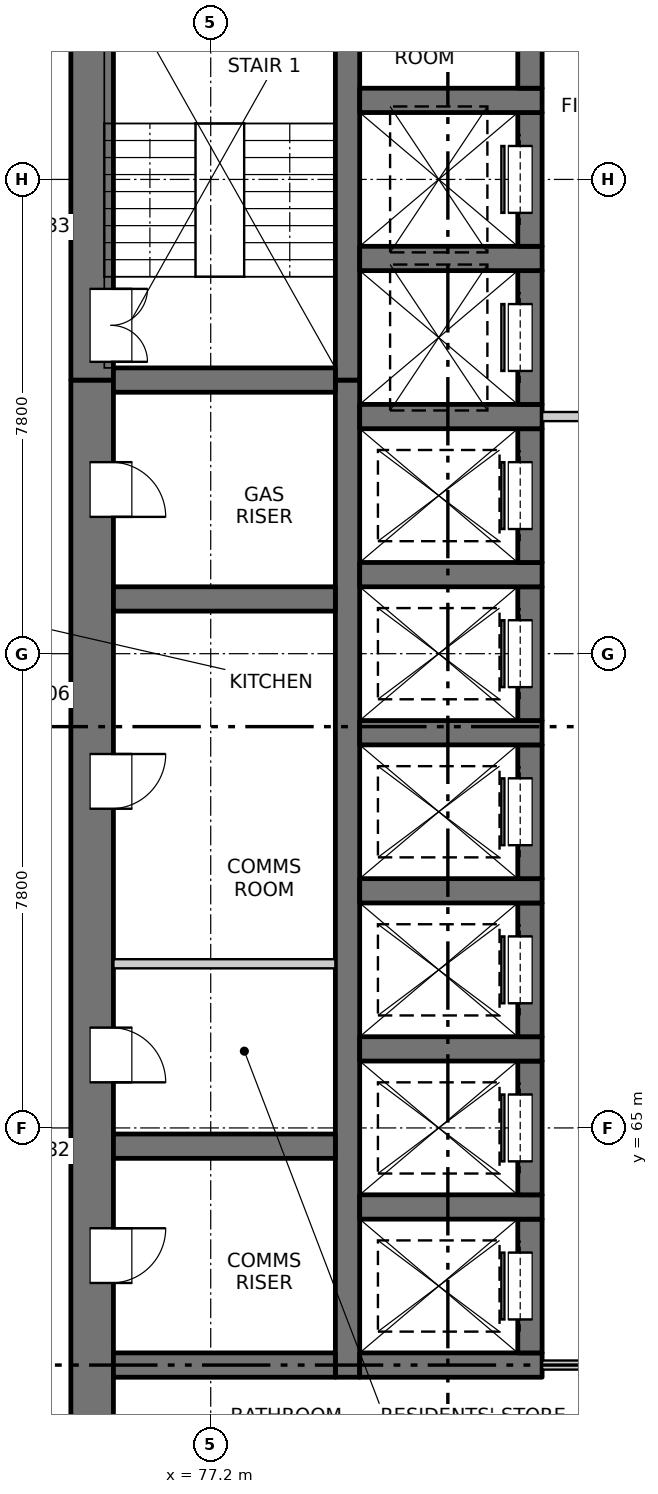
"""IFC4 building model, lengths in metres.
Left out: names, types, materials, properties, quantities, classifications, styles, units other than length and angle.
Written with IfcOpenShell. Run it as: python <this file> out.ifc"""

import sys

from ifc_helpers import new_model, si_unit, direction, frame, frame_2d, origin, place, context, subcontext, project, spatial, rectangle, extrude, element, fill, save


model = new_model("IFC4")
c1 = context("Model", 3, precision=1e-05, world=origin(), true_north=direction((0.0, 1.0)))
c2 = subcontext(c1, "Body", "Model", "MODEL_VIEW")
j1 = project(units=[si_unit("LENGTHUNIT", "METRE"), si_unit("PLANEANGLEUNIT", "RADIAN")], contexts=[c1])
p1 = place(None, origin())
s1 = spatial("IfcSite", under=j1, at=p1, CompositionType="ELEMENT")
p2 = place(p1, origin())
s2 = spatial("IfcBuilding", under=s1, at=p2, CompositionType="ELEMENT")
p3 = place(p2, frame((0.0, 0.0, 19.5)))
s3 = spatial("IfcBuildingStorey", under=s2, at=p3, CompositionType="ELEMENT", Elevation=19.5)
p4 = place(p3, frame((75.25, 54.9, -0.25), z_axis=(0.0, 0.0, 1.0), x_axis=(0.0, 1.0, 0.0)))
e1 = element("IfcWall", 1, at=p4, inside=s3, PredefinedType="SOLIDWALL", context=c2, shape_type="SweptSolid", body=[
    extrude(rectangle(XDim=22.4, YDim=0.7, at=frame_2d((11.2, 0.0))), origin(), (0.0, 0.0, 1.0), 3.4),
])
p5 = place(p4, frame((7.55, 0.0, 0.25)))
e2 = element("IfcOpeningElement", 2, at=p5, cuts=e1, PredefinedType="OPENING", context=c2, shape_type="SweptSolid", body=[
    extrude(rectangle(XDim=0.9, YDim=2.1, at=frame_2d((0.45, 1.05))), frame((0.0, 0.36, 0.0), z_axis=(0.0, -1.0, 0.0), x_axis=(1.0, 0.0, 0.0)), (0.0, 0.0, 1.0), 0.72),
])
p6 = place(p4, frame((10.85, 0.0, 0.25)))
e3 = element("IfcOpeningElement", 3, at=p6, cuts=e1, PredefinedType="OPENING", context=c2, shape_type="SweptSolid", body=[
    extrude(rectangle(XDim=0.9, YDim=2.1, at=frame_2d((0.45, 1.05))), frame((0.0, 0.36, 0.0), z_axis=(0.0, -1.0, 0.0), x_axis=(1.0, 0.0, 0.0)), (0.0, 0.0, 1.0), 0.72),
])
p7 = place(p4, frame((15.35, 0.0, 0.25)))
e4 = element("IfcOpeningElement", 4, at=p7, cuts=e1, PredefinedType="OPENING", context=c2, shape_type="SweptSolid", body=[
    extrude(rectangle(XDim=0.9, YDim=2.1, at=frame_2d((0.45, 1.05))), frame((0.0, 0.36, 0.0), z_axis=(0.0, -1.0, 0.0), x_axis=(1.0, 0.0, 0.0)), (0.0, 0.0, 1.0), 0.72),
])
p8 = place(p4, frame((20.15, 0.0, 0.25)))
e5 = element("IfcOpeningElement", 5, at=p8, cuts=e1, PredefinedType="OPENING", context=c2, shape_type="SweptSolid", body=[
    extrude(rectangle(XDim=0.9, YDim=2.1, at=frame_2d((0.45, 1.05))), frame((0.0, 0.36, 0.0), z_axis=(0.0, -1.0, 0.0), x_axis=(1.0, 0.0, 0.0)), (0.0, 0.0, 1.0), 0.72),
])
p9 = place(p3, frame((75.25, 77.3, -0.25), z_axis=(0.0, 0.0, 1.0), x_axis=(0.0, 1.0, 0.0)))
e6 = element("IfcWall", 6, at=p9, inside=s3, PredefinedType="SOLIDWALL", context=c2, shape_type="SweptSolid", body=[
    extrude(rectangle(XDim=7.55, YDim=0.7, at=frame_2d((3.775, 0.0))), origin(), (0.0, 0.0, 1.0), 3.4),
])
p10 = place(p9, frame((0.3, 0.0, 0.25)))
e7 = element("IfcOpeningElement", 7, at=p10, cuts=e6, PredefinedType="OPENING", context=c2, shape_type="SweptSolid", body=[
    extrude(rectangle(XDim=1.2, YDim=2.1, at=frame_2d((0.6, 1.05))), frame((0.0, 0.36, 0.0), z_axis=(0.0, -1.0, 0.0), x_axis=(1.0, 0.0, 0.0)), (0.0, 0.0, 1.0), 0.72),
])
p11 = place(p3, frame((79.45, 60.9, -0.25), z_axis=(0.0, 0.0, 1.0), x_axis=(0.0, 1.0, 0.0)))
e8 = element("IfcWall", 8, at=p11, inside=s3, PredefinedType="SOLIDWALL", context=c2, shape_type="SweptSolid", body=[
    extrude(rectangle(XDim=16.4, YDim=0.4, at=frame_2d((8.2, 0.0))), origin(), (0.0, 0.0, 1.0), 3.4),
])
p12 = place(p3, frame((79.45, 77.3, -0.25), z_axis=(0.0, 0.0, 1.0), x_axis=(0.0, 1.0, 0.0)))
e9 = element("IfcWall", 9, at=p12, inside=s3, PredefinedType="SOLIDWALL", context=c2, shape_type="SweptSolid", body=[
    extrude(rectangle(XDim=6.85, YDim=0.4, at=frame_2d((3.425, 0.0))), origin(), (0.0, 0.0, 1.0), 3.4),
])
p13 = place(p3, frame((79.65, 61.1, -0.25), z_axis=(0.0, 0.0, 1.0), x_axis=(1.0, 0.0, 0.0)))
e10 = element("IfcWall", 10, at=p13, inside=s3, PredefinedType="SOLIDWALL", context=c2, shape_type="SweptSolid", body=[
    extrude(rectangle(XDim=3.0, YDim=0.4, at=frame_2d((1.5, 0.0))), origin(), (0.0, 0.0, 1.0), 3.4),
])
p14 = place(p3, frame((82.45, 61.3, -0.25), z_axis=(0.0, 0.0, 1.0), x_axis=(0.0, 1.0, 0.0)))
e11 = element("IfcWall", 11, at=p14, inside=s3, PredefinedType="SOLIDWALL", context=c2, shape_type="SweptSolid", body=[
    extrude(rectangle(XDim=2.2, YDim=0.4, at=frame_2d((1.1, 0.0))), origin(), (0.0, 0.0, 1.0), 3.4),
])
p15 = place(p14, frame((0.55, 0.0, 0.25)))
e12 = element("IfcOpeningElement", 12, at=p15, cuts=e11, PredefinedType="OPENING", context=c2, shape_type="SweptSolid", body=[
    extrude(rectangle(XDim=1.1, YDim=2.1, at=frame_2d((0.55, 1.05))), frame((0.0, 0.21, 0.0), z_axis=(0.0, -1.0, 0.0), x_axis=(1.0, 0.0, 0.0)), (0.0, 0.0, 1.0), 0.42),
])
p16 = place(p3, frame((79.65, 63.7, -0.25), z_axis=(0.0, 0.0, 1.0), x_axis=(1.0, 0.0, 0.0)))
e13 = element("IfcWall", 13, at=p16, inside=s3, PredefinedType="SOLIDWALL", context=c2, shape_type="SweptSolid", body=[
    extrude(rectangle(XDim=3.0, YDim=0.4, at=frame_2d((1.5, 0.0))), origin(), (0.0, 0.0, 1.0), 3.4),
])
p17 = place(p3, frame((82.45, 63.9, -0.25), z_axis=(0.0, 0.0, 1.0), x_axis=(0.0, 1.0, 0.0)))
e14 = element("IfcWall", 14, at=p17, inside=s3, PredefinedType="SOLIDWALL", context=c2, shape_type="SweptSolid", body=[
    extrude(rectangle(XDim=2.2, YDim=0.4, at=frame_2d((1.1, 0.0))), origin(), (0.0, 0.0, 1.0), 3.4),
])
p18 = place(p17, frame((0.55, 0.0, 0.25)))
e15 = element("IfcOpeningElement", 15, at=p18, cuts=e14, PredefinedType="OPENING", context=c2, shape_type="SweptSolid", body=[
    extrude(rectangle(XDim=1.1, YDim=2.1, at=frame_2d((0.55, 1.05))), frame((0.0, 0.21, 0.0), z_axis=(0.0, -1.0, 0.0), x_axis=(1.0, 0.0, 0.0)), (0.0, 0.0, 1.0), 0.42),
])
p19 = place(p3, frame((79.65, 66.3, -0.25), z_axis=(0.0, 0.0, 1.0), x_axis=(1.0, 0.0, 0.0)))
e16 = element("IfcWall", 16, at=p19, inside=s3, PredefinedType="SOLIDWALL", context=c2, shape_type="SweptSolid", body=[
    extrude(rectangle(XDim=3.0, YDim=0.4, at=frame_2d((1.5, 0.0))), origin(), (0.0, 0.0, 1.0), 3.4),
])
p20 = place(p3, frame((82.45, 66.5, -0.25), z_axis=(0.0, 0.0, 1.0), x_axis=(0.0, 1.0, 0.0)))
e17 = element("IfcWall", 17, at=p20, inside=s3, PredefinedType="SOLIDWALL", context=c2, shape_type="SweptSolid", body=[
    extrude(rectangle(XDim=2.2, YDim=0.4, at=frame_2d((1.1, 0.0))), origin(), (0.0, 0.0, 1.0), 3.4),
])
p21 = place(p20, frame((0.55, 0.0, 0.25)))
e18 = element("IfcOpeningElement", 18, at=p21, cuts=e17, PredefinedType="OPENING", context=c2, shape_type="SweptSolid", body=[
    extrude(rectangle(XDim=1.1, YDim=2.1, at=frame_2d((0.55, 1.05))), frame((0.0, 0.21, 0.0), z_axis=(0.0, -1.0, 0.0), x_axis=(1.0, 0.0, 0.0)), (0.0, 0.0, 1.0), 0.42),
])
p22 = place(p3, frame((79.65, 68.9, -0.25), z_axis=(0.0, 0.0, 1.0), x_axis=(1.0, 0.0, 0.0)))
e19 = element("IfcWall", 19, at=p22, inside=s3, PredefinedType="SOLIDWALL", context=c2, shape_type="SweptSolid", body=[
    extrude(rectangle(XDim=3.0, YDim=0.4, at=frame_2d((1.5, 0.0))), origin(), (0.0, 0.0, 1.0), 3.4),
])
p23 = place(p3, frame((82.45, 69.1, -0.25), z_axis=(0.0, 0.0, 1.0), x_axis=(0.0, 1.0, 0.0)))
e20 = element("IfcWall", 20, at=p23, inside=s3, PredefinedType="SOLIDWALL", context=c2, shape_type="SweptSolid", body=[
    extrude(rectangle(XDim=2.2, YDim=0.4, at=frame_2d((1.1, 0.0))), origin(), (0.0, 0.0, 1.0), 3.4),
])
p24 = place(p23, frame((0.55, 0.0, 0.25)))
e21 = element("IfcOpeningElement", 21, at=p24, cuts=e20, PredefinedType="OPENING", context=c2, shape_type="SweptSolid", body=[
    extrude(rectangle(XDim=1.1, YDim=2.1, at=frame_2d((0.55, 1.05))), frame((0.0, 0.21, 0.0), z_axis=(0.0, -1.0, 0.0), x_axis=(1.0, 0.0, 0.0)), (0.0, 0.0, 1.0), 0.42),
])
p25 = place(p3, frame((79.65, 71.5, -0.25), z_axis=(0.0, 0.0, 1.0), x_axis=(1.0, 0.0, 0.0)))
e22 = element("IfcWall", 22, at=p25, inside=s3, PredefinedType="SOLIDWALL", context=c2, shape_type="SweptSolid", body=[
    extrude(rectangle(XDim=3.0, YDim=0.4, at=frame_2d((1.5, 0.0))), origin(), (0.0, 0.0, 1.0), 3.4),
])
p26 = place(p3, frame((82.45, 71.7, -0.25), z_axis=(0.0, 0.0, 1.0), x_axis=(0.0, 1.0, 0.0)))
e23 = element("IfcWall", 23, at=p26, inside=s3, PredefinedType="SOLIDWALL", context=c2, shape_type="SweptSolid", body=[
    extrude(rectangle(XDim=2.2, YDim=0.4, at=frame_2d((1.1, 0.0))), origin(), (0.0, 0.0, 1.0), 3.4),
])
p27 = place(p26, frame((0.55, 0.0, 0.25)))
e24 = element("IfcOpeningElement", 24, at=p27, cuts=e23, PredefinedType="OPENING", context=c2, shape_type="SweptSolid", body=[
    extrude(rectangle(XDim=1.1, YDim=2.1, at=frame_2d((0.55, 1.05))), frame((0.0, 0.21, 0.0), z_axis=(0.0, -1.0, 0.0), x_axis=(1.0, 0.0, 0.0)), (0.0, 0.0, 1.0), 0.42),
])
p28 = place(p3, frame((79.65, 74.1, -0.25), z_axis=(0.0, 0.0, 1.0), x_axis=(1.0, 0.0, 0.0)))
e25 = element("IfcWall", 25, at=p28, inside=s3, PredefinedType="SOLIDWALL", context=c2, shape_type="SweptSolid", body=[
    extrude(rectangle(XDim=3.0, YDim=0.4, at=frame_2d((1.5, 0.0))), origin(), (0.0, 0.0, 1.0), 3.4),
])
p29 = place(p3, frame((82.45, 74.3, -0.25), z_axis=(0.0, 0.0, 1.0), x_axis=(0.0, 1.0, 0.0)))
e26 = element("IfcWall", 26, at=p29, inside=s3, PredefinedType="SOLIDWALL", context=c2, shape_type="SweptSolid", body=[
    extrude(rectangle(XDim=2.2, YDim=0.4, at=frame_2d((1.1, 0.0))), origin(), (0.0, 0.0, 1.0), 3.4),
])
p30 = place(p29, frame((0.55, 0.0, 0.25)))
e27 = element("IfcOpeningElement", 27, at=p30, cuts=e26, PredefinedType="OPENING", context=c2, shape_type="SweptSolid", body=[
    extrude(rectangle(XDim=1.1, YDim=2.1, at=frame_2d((0.55, 1.05))), frame((0.0, 0.21, 0.0), z_axis=(0.0, -1.0, 0.0), x_axis=(1.0, 0.0, 0.0)), (0.0, 0.0, 1.0), 0.42),
])
p31 = place(p3, frame((79.65, 76.7, -0.25), z_axis=(0.0, 0.0, 1.0), x_axis=(1.0, 0.0, 0.0)))
e28 = element("IfcWall", 28, at=p31, inside=s3, PredefinedType="SOLIDWALL", context=c2, shape_type="SweptSolid", body=[
    extrude(rectangle(XDim=3.0, YDim=0.4, at=frame_2d((1.5, 0.0))), origin(), (0.0, 0.0, 1.0), 3.4),
])
p32 = place(p3, frame((82.45, 76.9, -0.25), z_axis=(0.0, 0.0, 1.0), x_axis=(0.0, 1.0, 0.0)))
e29 = element("IfcWall", 29, at=p32, inside=s3, PredefinedType="SOLIDWALL", context=c2, shape_type="SweptSolid", body=[
    extrude(rectangle(XDim=2.2, YDim=0.4, at=frame_2d((1.1, 0.0))), origin(), (0.0, 0.0, 1.0), 3.4),
])
p33 = place(p32, frame((0.55, 0.0, 0.25)))
e30 = element("IfcOpeningElement", 30, at=p33, cuts=e29, PredefinedType="OPENING", context=c2, shape_type="SweptSolid", body=[
    extrude(rectangle(XDim=1.1, YDim=2.1, at=frame_2d((0.55, 1.05))), frame((0.0, 0.21, 0.0), z_axis=(0.0, -1.0, 0.0), x_axis=(1.0, 0.0, 0.0)), (0.0, 0.0, 1.0), 0.42),
])
p34 = place(p3, frame((79.65, 79.3, -0.25), z_axis=(0.0, 0.0, 1.0), x_axis=(1.0, 0.0, 0.0)))
e31 = element("IfcWall", 31, at=p34, inside=s3, PredefinedType="SOLIDWALL", context=c2, shape_type="SweptSolid", body=[
    extrude(rectangle(XDim=3.0, YDim=0.4, at=frame_2d((1.5, 0.0))), origin(), (0.0, 0.0, 1.0), 3.4),
])
p35 = place(p3, frame((82.45, 79.5, -0.25), z_axis=(0.0, 0.0, 1.0), x_axis=(0.0, 1.0, 0.0)))
e32 = element("IfcWall", 32, at=p35, inside=s3, PredefinedType="SOLIDWALL", context=c2, shape_type="SweptSolid", body=[
    extrude(rectangle(XDim=2.2, YDim=0.4, at=frame_2d((1.1, 0.0))), origin(), (0.0, 0.0, 1.0), 3.4),
])
p36 = place(p35, frame((0.55, 0.0, 0.25)))
e33 = element("IfcOpeningElement", 33, at=p36, cuts=e32, PredefinedType="OPENING", context=c2, shape_type="SweptSolid", body=[
    extrude(rectangle(XDim=1.1, YDim=2.1, at=frame_2d((0.55, 1.05))), frame((0.0, 0.21, 0.0), z_axis=(0.0, -1.0, 0.0), x_axis=(1.0, 0.0, 0.0)), (0.0, 0.0, 1.0), 0.42),
])
p37 = place(p3, frame((79.65, 81.9, -0.25), z_axis=(0.0, 0.0, 1.0), x_axis=(1.0, 0.0, 0.0)))
e34 = element("IfcWall", 34, at=p37, inside=s3, PredefinedType="SOLIDWALL", context=c2, shape_type="SweptSolid", body=[
    extrude(rectangle(XDim=3.0, YDim=0.4, at=frame_2d((1.5, 0.0))), origin(), (0.0, 0.0, 1.0), 3.4),
])
p38 = place(p3, frame((82.45, 82.1, -0.25), z_axis=(0.0, 0.0, 1.0), x_axis=(0.0, 1.0, 0.0)))
e35 = element("IfcWall", 35, at=p38, inside=s3, PredefinedType="SOLIDWALL", context=c2, shape_type="SweptSolid", body=[
    extrude(rectangle(XDim=2.05, YDim=0.4, at=frame_2d((1.025, 0.0))), origin(), (0.0, 0.0, 1.0), 3.4),
])
p39 = place(p38, frame((0.65, 0.0, 0.25)))
e36 = element("IfcOpeningElement", 36, at=p39, cuts=e35, PredefinedType="OPENING", context=c2, shape_type="SweptSolid", body=[
    extrude(rectangle(XDim=0.9, YDim=2.1, at=frame_2d((0.45, 1.05))), frame((0.0, 0.21, 0.0), z_axis=(0.0, -1.0, 0.0), x_axis=(1.0, 0.0, 0.0)), (0.0, 0.0, 1.0), 0.42),
])
for number, where, z_axis, x_axis in (
    (37, (75.6, 61.1, -0.25), (0.0, 0.0, 1.0), (1.0, 0.0, 0.0)),
    (38, (75.6, 64.7, -0.25), (0.0, 0.0, 1.0), (1.0, 0.0, 0.0)),
    (39, (75.6, 73.7, -0.25), (0.0, 0.0, 1.0), (1.0, 0.0, 0.0)),
    (40, (75.6, 77.3, -0.25), (0.0, 0.0, 1.0), (1.0, 0.0, 0.0)),
):
    element("IfcWall", number, at=place(p3, frame(where, z_axis=z_axis, x_axis=x_axis)), inside=s3, PredefinedType="SOLIDWALL", context=c2, shape_type="SweptSolid", body=[
        extrude(rectangle(XDim=3.65, YDim=0.4, at=frame_2d((1.825, 0.0))), origin(), (0.0, 0.0, 1.0), 3.4),
    ])
p40 = place(p3, frame((82.65, 61.1, 0.0), z_axis=(0.0, 0.0, 1.0), x_axis=(1.0, 0.0, 0.0)))
e41 = element("IfcWall", 41, at=p40, inside=s3, PredefinedType="PARTITIONING", context=c2, shape_type="SweptSolid", body=[
    extrude(rectangle(XDim=4.7, YDim=0.15, at=frame_2d((2.35, 0.0))), origin(), (0.0, 0.0, 1.0), 3.15),
])
p41 = place(p40, frame((1.45, 0.0, 0.0)))
e42 = element("IfcOpeningElement", 42, at=p41, cuts=e41, PredefinedType="OPENING", context=c2, shape_type="SweptSolid", body=[
    extrude(rectangle(XDim=1.8, YDim=2.1, at=frame_2d((0.9, 1.05))), frame((0.0, 0.085, 0.0), z_axis=(0.0, -1.0, 0.0), x_axis=(1.0, 0.0, 0.0)), (0.0, 0.0, 1.0), 0.17),
])
p42 = place(p3, frame((75.6, 67.7, 0.0), z_axis=(0.0, 0.0, 1.0), x_axis=(1.0, 0.0, 0.0)))
e43 = element("IfcWall", 43, at=p42, inside=s3, PredefinedType="PARTITIONING", context=c2, shape_type="SweptSolid", body=[
    extrude(rectangle(XDim=3.65, YDim=0.15, at=frame_2d((1.825, 0.0))), origin(), (0.0, 0.0, 1.0), 3.15),
])
p43 = place(p3, frame((82.65, 76.7, 0.0), z_axis=(0.0, 0.0, 1.0), x_axis=(1.0, 0.0, 0.0)))
e44 = element("IfcWall", 44, at=p43, inside=s3, PredefinedType="PARTITIONING", context=c2, shape_type="SweptSolid", body=[
    extrude(rectangle(XDim=4.7, YDim=0.15, at=frame_2d((2.35, 0.0))), origin(), (0.0, 0.0, 1.0), 3.15),
])
p44 = place(p43, frame((1.45, 0.0, 0.0)))
e45 = element("IfcOpeningElement", 45, at=p44, cuts=e44, PredefinedType="OPENING", context=c2, shape_type="SweptSolid", body=[
    extrude(rectangle(XDim=1.8, YDim=2.1, at=frame_2d((0.9, 1.05))), frame((0.0, 0.085, 0.0), z_axis=(0.0, -1.0, 0.0), x_axis=(1.0, 0.0, 0.0)), (0.0, 0.0, 1.0), 0.17),
])
p45 = place(p15, origin())
e46 = element("IfcDoor", 46, at=p45, inside=s3, OperationType="SLIDING_TO_RIGHT", PredefinedType="DOOR", context=c2, shape_type="SweptSolid", body=[
    extrude(rectangle(XDim=1.1, YDim=2.1, at=frame_2d((0.55, 1.05))), frame((0.0, 0.185, 0.0), z_axis=(0.0, -1.0, 0.0), x_axis=(1.0, 0.0, 0.0)), (0.0, 0.0, 1.0), 0.05),
])
fill(e12, e46)
p46 = place(p5, origin())
e47 = element("IfcDoor", 47, at=p46, inside=s3, OperationType="SINGLE_SWING_LEFT", PredefinedType="DOOR", context=c2, shape_type="SweptSolid", body=[
    extrude(rectangle(XDim=0.9, YDim=2.1, at=frame_2d((0.45, 1.05))), frame((0.0, -0.285, 0.0), z_axis=(0.0, -1.0, 0.0), x_axis=(1.0, 0.0, 0.0)), (0.0, 0.0, 1.0), 0.05),
])
fill(e2, e47)
p47 = place(p18, origin())
e48 = element("IfcDoor", 48, at=p47, inside=s3, OperationType="SLIDING_TO_RIGHT", PredefinedType="DOOR", context=c2, shape_type="SweptSolid", body=[
    extrude(rectangle(XDim=1.1, YDim=2.1, at=frame_2d((0.55, 1.05))), frame((0.0, 0.185, 0.0), z_axis=(0.0, -1.0, 0.0), x_axis=(1.0, 0.0, 0.0)), (0.0, 0.0, 1.0), 0.05),
])
fill(e15, e48)
p48 = place(p6, origin())
e49 = element("IfcDoor", 49, at=p48, inside=s3, OperationType="SINGLE_SWING_RIGHT", PredefinedType="DOOR", context=c2, shape_type="SweptSolid", body=[
    extrude(rectangle(XDim=0.9, YDim=2.1, at=frame_2d((0.45, 1.05))), frame((0.0, -0.285, 0.0), z_axis=(0.0, -1.0, 0.0), x_axis=(1.0, 0.0, 0.0)), (0.0, 0.0, 1.0), 0.05),
])
fill(e3, e49)
p49 = place(p21, origin())
e50 = element("IfcDoor", 50, at=p49, inside=s3, OperationType="SLIDING_TO_RIGHT", PredefinedType="DOOR", context=c2, shape_type="SweptSolid", body=[
    extrude(rectangle(XDim=1.1, YDim=2.1, at=frame_2d((0.55, 1.05))), frame((0.0, 0.185, 0.0), z_axis=(0.0, -1.0, 0.0), x_axis=(1.0, 0.0, 0.0)), (0.0, 0.0, 1.0), 0.05),
])
fill(e18, e50)
p50 = place(p24, origin())
e51 = element("IfcDoor", 51, at=p50, inside=s3, OperationType="SLIDING_TO_LEFT", PredefinedType="DOOR", context=c2, shape_type="SweptSolid", body=[
    extrude(rectangle(XDim=1.1, YDim=2.1, at=frame_2d((0.55, 1.05))), frame((0.0, 0.185, 0.0), z_axis=(0.0, -1.0, 0.0), x_axis=(1.0, 0.0, 0.0)), (0.0, 0.0, 1.0), 0.05),
])
fill(e21, e51)
p51 = place(p7, origin())
e52 = element("IfcDoor", 52, at=p51, inside=s3, OperationType="SINGLE_SWING_LEFT", PredefinedType="DOOR", context=c2, shape_type="SweptSolid", body=[
    extrude(rectangle(XDim=0.9, YDim=2.1, at=frame_2d((0.45, 1.05))), frame((0.0, -0.285, 0.0), z_axis=(0.0, -1.0, 0.0), x_axis=(1.0, 0.0, 0.0)), (0.0, 0.0, 1.0), 0.05),
])
fill(e4, e52)
p52 = place(p27, origin())
e53 = element("IfcDoor", 53, at=p52, inside=s3, OperationType="SLIDING_TO_LEFT", PredefinedType="DOOR", context=c2, shape_type="SweptSolid", body=[
    extrude(rectangle(XDim=1.1, YDim=2.1, at=frame_2d((0.55, 1.05))), frame((0.0, 0.185, 0.0), z_axis=(0.0, -1.0, 0.0), x_axis=(1.0, 0.0, 0.0)), (0.0, 0.0, 1.0), 0.05),
])
fill(e24, e53)
p53 = place(p30, origin())
e54 = element("IfcDoor", 54, at=p53, inside=s3, OperationType="SLIDING_TO_LEFT", PredefinedType="DOOR", context=c2, shape_type="SweptSolid", body=[
    extrude(rectangle(XDim=1.1, YDim=2.1, at=frame_2d((0.55, 1.05))), frame((0.0, 0.185, 0.0), z_axis=(0.0, -1.0, 0.0), x_axis=(1.0, 0.0, 0.0)), (0.0, 0.0, 1.0), 0.05),
])
fill(e27, e54)
p54 = place(p8, origin())
e55 = element("IfcDoor", 55, at=p54, inside=s3, OperationType="SINGLE_SWING_RIGHT", PredefinedType="DOOR", context=c2, shape_type="SweptSolid", body=[
    extrude(rectangle(XDim=0.9, YDim=2.1, at=frame_2d((0.45, 1.05))), frame((0.0, -0.285, 0.0), z_axis=(0.0, -1.0, 0.0), x_axis=(1.0, 0.0, 0.0)), (0.0, 0.0, 1.0), 0.05),
])
fill(e5, e55)
p55 = place(p33, origin())
e56 = element("IfcDoor", 56, at=p55, inside=s3, OperationType="SLIDING_TO_LEFT", PredefinedType="DOOR", context=c2, shape_type="SweptSolid", body=[
    extrude(rectangle(XDim=1.1, YDim=2.1, at=frame_2d((0.55, 1.05))), frame((0.0, 0.185, 0.0), z_axis=(0.0, -1.0, 0.0), x_axis=(1.0, 0.0, 0.0)), (0.0, 0.0, 1.0), 0.05),
])
fill(e30, e56)
p56 = place(p10, origin())
e57 = element("IfcDoor", 57, at=p56, inside=s3, OperationType="DOUBLE_DOOR_SINGLE_SWING", PredefinedType="DOOR", context=c2, shape_type="SweptSolid", body=[
    extrude(rectangle(XDim=1.2, YDim=2.1, at=frame_2d((0.6, 1.05))), frame((0.0, -0.285, 0.0), z_axis=(0.0, -1.0, 0.0), x_axis=(1.0, 0.0, 0.0)), (0.0, 0.0, 1.0), 0.05),
])
fill(e7, e57)
p57 = place(p36, origin())
e58 = element("IfcDoor", 58, at=p57, inside=s3, OperationType="SLIDING_TO_LEFT", PredefinedType="DOOR", context=c2, shape_type="SweptSolid", body=[
    extrude(rectangle(XDim=1.1, YDim=2.1, at=frame_2d((0.55, 1.05))), frame((0.0, 0.185, 0.0), z_axis=(0.0, -1.0, 0.0), x_axis=(1.0, 0.0, 0.0)), (0.0, 0.0, 1.0), 0.05),
])
fill(e33, e58)
save(model, sys.argv[1])
